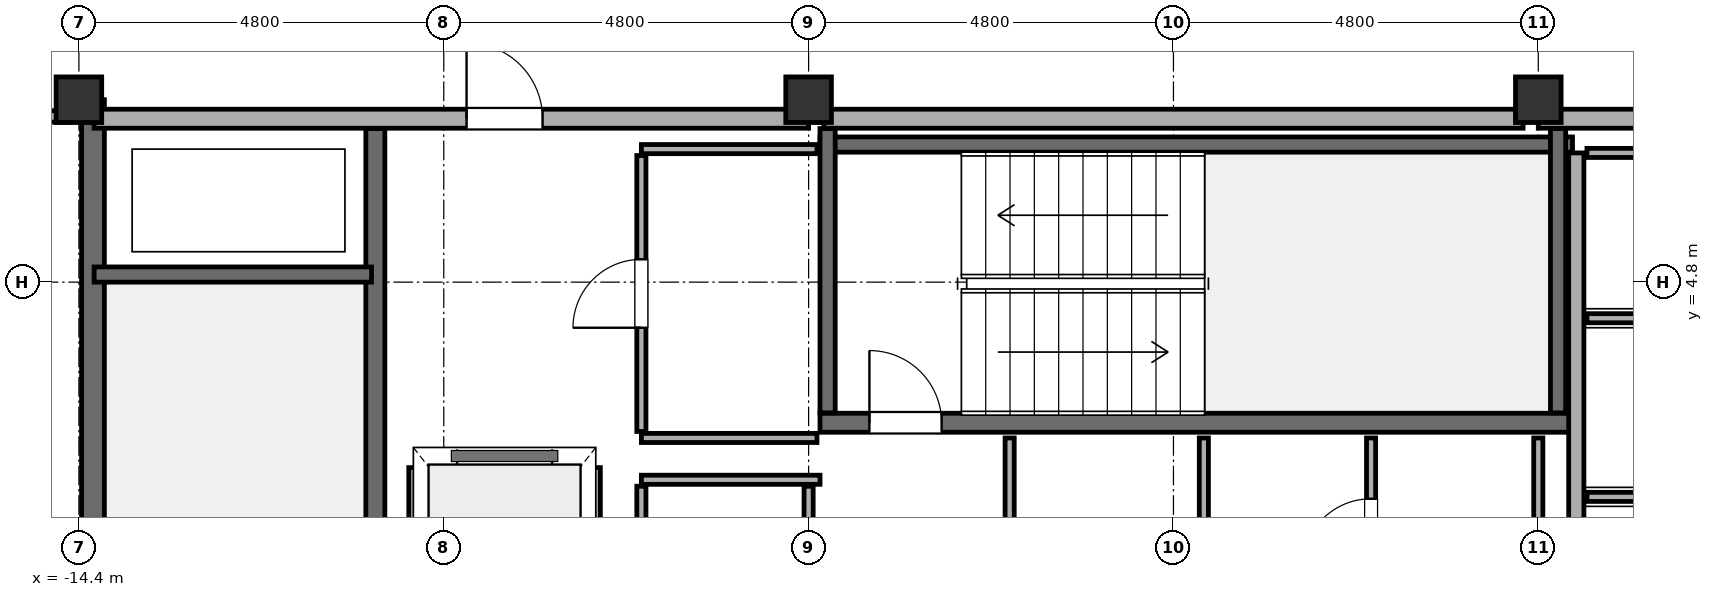
"""IFC4 building model, lengths in metres.
Left out: names, types, materials, properties, quantities, classifications, styles, units other than length and angle.
Written with IfcOpenShell. Run it as: python <this file> out.ifc"""

import sys

from ifc_helpers import new_model, si_unit, direction, frame, frame_2d, origin, origin_2d, place, context, subcontext, project, spatial, rectangle, hollow_rectangle, extrude, element, fill, save


model = new_model("IFC4")
c1 = context("Model", 3, precision=1e-05, world=origin(), true_north=direction((0.0, 1.0)))
c2 = subcontext(c1, "Body", "Model", "MODEL_VIEW")
j1 = project(units=[si_unit("LENGTHUNIT", "METRE"), si_unit("PLANEANGLEUNIT", "RADIAN")], contexts=[c1])
p1 = place(None, origin())
s1 = spatial("IfcSite", under=j1, at=p1, CompositionType="ELEMENT")
p2 = place(p1, origin())
s2 = spatial("IfcBuilding", under=s1, at=p2, CompositionType="ELEMENT")
p3 = place(p2, frame((0.0, 0.0, 249.25)))
s3 = spatial("IfcBuildingStorey", under=s2, at=p3, CompositionType="ELEMENT", Elevation=249.25)
for number, where, z_axis, x_axis in (
    (1, (-14.4, 7.2, 0.0), (0.0, 0.0, 1.0), (1.0, 0.0, 0.0)),
    (2, (-4.8, 7.2, 0.0), (0.0, 0.0, 1.0), (1.0, 0.0, 0.0)),
    (3, (4.8, 7.2, 0.0), (0.0, 0.0, 1.0), (1.0, 0.0, 0.0)),
):
    element("IfcColumn", number, at=place(p3, frame(where, z_axis=z_axis, x_axis=x_axis)), inside=s3, PredefinedType="COLUMN", context=c2, shape_type="SweptSolid", body=[
        extrude(hollow_rectangle(XDim=0.6, YDim=0.6, WallThickness=0.028, at=origin_2d()), origin(), (0.0, 0.0, 1.0), 3.85),
    ])
p4 = place(p3, frame((-14.215, -7.2, -0.18), z_axis=(0.0, 0.0, 1.0), x_axis=(0.0, 1.0, 0.0)))
e4 = element("IfcWall", 4, at=p4, inside=s3, PredefinedType="SHEAR", context=c2, shape_type="SweptSolid", body=[
    extrude(rectangle(XDim=14.4, YDim=0.3, at=frame_2d((7.2, 0.0))), origin(), (0.0, 0.0, 1.0), 3.85),
])
p5 = place(p3, frame((-14.2, 6.95, 0.0), z_axis=(0.0, 0.0, 1.0), x_axis=(1.0, 0.0, 0.0)))
e5 = element("IfcWall", 5, at=p5, inside=s3, PredefinedType="SOLIDWALL", context=c2, shape_type="SweptSolid", body=[
    extrude(rectangle(XDim=9.4, YDim=0.25, at=frame_2d((4.7, 0.0))), origin(), (0.0, 0.0, 1.0), 2.27),
])
p6 = place(p5, frame((4.9, 0.0, 0.0)))
e6 = element("IfcOpeningElement", 6, at=p6, cuts=e5, PredefinedType="OPENING", context=c2, shape_type="SweptSolid", body=[
    extrude(rectangle(XDim=1.0, YDim=2.15, at=frame_2d((0.5, 1.075))), frame((0.0, 0.14, 0.0), z_axis=(0.0, -1.0, 0.0), x_axis=(1.0, 0.0, 0.0)), (0.0, 0.0, 1.0), 0.28),
])
p7 = place(p3, frame((-4.6, 6.95, 0.0), z_axis=(0.0, 0.0, 1.0), x_axis=(1.0, 0.0, 0.0)))
e7 = element("IfcWall", 7, at=p7, inside=s3, PredefinedType="SOLIDWALL", context=c2, shape_type="SweptSolid", body=[
    extrude(rectangle(XDim=9.2, YDim=0.25, at=frame_2d((4.6, 0.0))), origin(), (0.0, 0.0, 1.0), 2.27),
])
p8 = place(p3, frame((4.8, 6.95, 0.0), z_axis=(0.0, 0.0, 1.0), x_axis=(1.0, 0.0, 0.0)))
e8 = element("IfcWall", 8, at=p8, inside=s3, PredefinedType="SOLIDWALL", context=c2, shape_type="SweptSolid", body=[
    extrude(rectangle(XDim=9.4, YDim=0.25, at=frame_2d((4.7, 0.0))), origin(), (0.0, 0.0, 1.0), 2.27),
])
p9 = place(p8, frame((3.5, 0.0, 0.0)))
e9 = element("IfcOpeningElement", 9, at=p9, cuts=e8, PredefinedType="OPENING", context=c2, shape_type="SweptSolid", body=[
    extrude(rectangle(XDim=1.2, YDim=2.2, at=frame_2d((0.6, 1.1))), frame((0.0, 0.14, 0.0), z_axis=(0.0, -1.0, 0.0), x_axis=(1.0, 0.0, 0.0)), (0.0, 0.0, 1.0), 0.28),
])
p10 = place(p3, frame((-10.5, -6.82, -0.18), z_axis=(0.0, 0.0, 1.0), x_axis=(0.0, 1.0, 0.0)))
e10 = element("IfcWall", 10, at=p10, inside=s3, PredefinedType="SOLIDWALL", context=c2, shape_type="SweptSolid", body=[
    extrude(rectangle(XDim=13.64, YDim=0.25, at=frame_2d((6.82, 0.0))), origin(), (0.0, 0.0, 1.0), 3.85),
])
p11 = place(p10, frame((2.32, 0.0, 0.18)))
e11 = element("IfcOpeningElement", 11, at=p11, cuts=e10, PredefinedType="OPENING", context=c2, shape_type="SweptSolid", body=[
    extrude(rectangle(XDim=0.95, YDim=2.15, at=frame_2d((0.475, 1.075))), frame((0.0, 0.14, 0.0), z_axis=(0.0, -1.0, 0.0), x_axis=(1.0, 0.0, 0.0)), (0.0, 0.0, 1.0), 0.28),
])
p12 = place(p3, frame((-14.2, 4.9, -0.18), z_axis=(0.0, 0.0, 1.0), x_axis=(1.0, 0.0, 0.0)))
e12 = element("IfcWall", 12, at=p12, inside=s3, PredefinedType="SOLIDWALL", context=c2, shape_type="SweptSolid", body=[
    extrude(rectangle(XDim=3.65, YDim=0.2, at=frame_2d((1.825, 0.0))), origin(), (0.0, 0.0, 1.0), 3.85),
])
p13 = place(p3, frame((-4.65, 2.95, -0.18), z_axis=(0.0, 0.0, 1.0), x_axis=(1.0, 0.0, 0.0)))
e13 = element("IfcWall", 13, at=p13, inside=s3, PredefinedType="SOLIDWALL", context=c2, shape_type="SweptSolid", body=[
    extrude(rectangle(XDim=9.9, YDim=0.25, at=frame_2d((4.95, 0.0))), origin(), (0.0, 0.0, 1.0), 3.85),
])
p14 = place(p13, frame((0.65, 0.0, 0.18)))
e14 = element("IfcOpeningElement", 14, at=p14, cuts=e13, PredefinedType="OPENING", context=c2, shape_type="SweptSolid", body=[
    extrude(rectangle(XDim=0.95, YDim=2.15, at=frame_2d((0.475, 1.075))), frame((0.0, 0.14, 0.0), z_axis=(0.0, -1.0, 0.0), x_axis=(1.0, 0.0, 0.0)), (0.0, 0.0, 1.0), 0.28),
])
p15 = place(p3, frame((-4.65, 6.61, -0.18), z_axis=(0.0, 0.0, 1.0), x_axis=(1.0, 0.0, 0.0)))
e15 = element("IfcWall", 15, at=p15, inside=s3, PredefinedType="SOLIDWALL", context=c2, shape_type="SweptSolid", body=[
    extrude(rectangle(XDim=9.9, YDim=0.2, at=frame_2d((4.95, 0.0))), origin(), (0.0, 0.0, 1.0), 3.85),
])
for number, where, z_axis, x_axis in (
    (16, (-4.55, 3.08, -0.18), (0.0, 0.0, 1.0), (0.0, 1.0, 0.0)),
    (17, (5.06, 3.08, -0.18), (0.0, 0.0, 1.0), (0.0, 1.0, 0.0)),
):
    element("IfcWall", number, at=place(p3, frame(where, z_axis=z_axis, x_axis=x_axis)), inside=s3, PredefinedType="SOLIDWALL", context=c2, shape_type="SweptSolid", body=[
        extrude(rectangle(XDim=3.74, YDim=0.2, at=frame_2d((1.87, 0.0))), origin(), (0.0, 0.0, 1.0), 3.85),
    ])
p16 = place(p3, frame((5.3, -0.3, 0.0), z_axis=(0.0, 0.0, 1.0), x_axis=(0.0, 1.0, 0.0)))
e18 = element("IfcWall", 18, at=p16, inside=s3, PredefinedType="SOLIDWALL", context=c2, shape_type="SweptSolid", body=[
    extrude(rectangle(XDim=6.8, YDim=0.2, at=frame_2d((3.4, 0.0))), origin(), (0.0, 0.0, 1.0), 3.67),
])
for number, where, z_axis, x_axis in (
    (19, (5.44, 1.975, 0.0), (0.0, 0.0, 1.0), (1.0, 0.0, 0.0)),
    (20, (5.44, 4.325, 0.0), (0.0, 0.0, 1.0), (1.0, 0.0, 0.0)),
    (21, (5.44, 6.5, 0.0), (0.0, 0.0, 1.0), (1.0, 0.0, 0.0)),
):
    element("IfcWall", number, at=place(p3, frame(where, z_axis=z_axis, x_axis=x_axis)), inside=s3, PredefinedType="PARTITIONING", context=c2, shape_type="SweptSolid", body=[
        extrude(rectangle(XDim=2.12, YDim=0.12, at=frame_2d((1.06, 0.0))), origin(), (0.0, 0.0, 1.0), 3.67),
    ])
p17 = place(p3, frame((-9.92, 2.5, 0.0), z_axis=(0.0, 0.0, 1.0), x_axis=(1.0, 0.0, 0.0)))
e22 = element("IfcWall", 22, at=p17, inside=s3, PredefinedType="SOLIDWALL", context=c2, shape_type="SweptSolid", body=[
    extrude(rectangle(XDim=2.24, YDim=0.2, at=frame_2d((1.12, 0.0))), origin(), (0.0, 0.0, 1.0), 3.67),
])
p18 = place(p17, frame((0.495, 0.0, 0.0)))
e23 = element("IfcOpeningElement", 23, at=p18, cuts=e22, PredefinedType="OPENING", context=c2, shape_type="SweptSolid", body=[
    extrude(rectangle(XDim=1.25, YDim=2.25, at=frame_2d((0.625, 1.125))), frame((0.0, 0.115, 0.0), z_axis=(0.0, -1.0, 0.0), x_axis=(1.0, 0.0, 0.0)), (0.0, 0.0, 1.0), 0.23),
])
for number, where, z_axis, x_axis in (
    (24, (-10.0, -0.16, 0.0), (0.0, 0.0, 1.0), (0.0, 1.0, 0.0)),
    (25, (-7.6, -0.16, 0.0), (0.0, 0.0, 1.0), (0.0, 1.0, 0.0)),
):
    element("IfcWall", number, at=place(p3, frame(where, z_axis=z_axis, x_axis=x_axis)), inside=s3, PredefinedType="PARTITIONING", context=c2, shape_type="SweptSolid", body=[
        extrude(rectangle(XDim=2.52, YDim=0.12, at=frame_2d((1.26, 0.0))), origin(), (0.0, 0.0, 1.0), 3.67),
    ])
p19 = place(p3, frame((-7.0, 2.2, 0.0), z_axis=(0.0, 0.0, 1.0), x_axis=(1.0, 0.0, 0.0)))
e26 = element("IfcWall", 26, at=p19, inside=s3, PredefinedType="PARTITIONING", context=c2, shape_type="SweptSolid", body=[
    extrude(rectangle(XDim=2.35, YDim=0.12, at=frame_2d((1.175, 0.0))), origin(), (0.0, 0.0, 1.0), 3.67),
])
for number, where, z_axis, x_axis in (
    (27, (-7.0, 2.75, 0.0), (0.0, 0.0, 1.0), (1.0, 0.0, 0.0)),
    (28, (-7.0, 6.55, 0.0), (0.0, 0.0, 1.0), (1.0, 0.0, 0.0)),
):
    element("IfcWall", number, at=place(p3, frame(where, z_axis=z_axis, x_axis=x_axis)), inside=s3, PredefinedType="PARTITIONING", context=c2, shape_type="SweptSolid", body=[
        extrude(rectangle(XDim=2.31, YDim=0.12, at=frame_2d((1.155, 0.0))), origin(), (0.0, 0.0, 1.0), 3.67),
    ])
p20 = place(p3, frame((-23.92, 6.98, 0.0), z_axis=(0.0, 0.0, 1.0), x_axis=(1.0, 0.0, 0.0)))
e29 = element("IfcWall", 29, at=p20, inside=s3, PredefinedType="PARTITIONING", context=c2, shape_type="SweptSolid", body=[
    extrude(rectangle(XDim=9.4, YDim=0.15, at=frame_2d((4.7, 0.0))), origin(), (0.0, 0.0, 1.0), 2.27),
])
p21 = place(p3, frame((-7.0, -3.11, 0.0), z_axis=(0.0, 0.0, 1.0), x_axis=(0.0, 1.0, 0.0)))
e30 = element("IfcWall", 30, at=p21, inside=s3, PredefinedType="PARTITIONING", context=c2, shape_type="SweptSolid", body=[
    extrude(rectangle(XDim=5.225, YDim=0.12, at=frame_2d((2.613, 0.0))), origin(), (0.0, 0.0, 1.0), 3.67),
])
p22 = place(p3, frame((-7.0, 2.835, 0.0), z_axis=(0.0, 0.0, 1.0), x_axis=(0.0, 1.0, 0.0)))
e31 = element("IfcWall", 31, at=p22, inside=s3, PredefinedType="PARTITIONING", context=c2, shape_type="SweptSolid", body=[
    extrude(rectangle(XDim=3.63, YDim=0.12, at=frame_2d((1.815, 0.0))), origin(), (0.0, 0.0, 1.0), 3.67),
])
p23 = place(p22, frame((1.365, 0.0, 0.0)))
e32 = element("IfcOpeningElement", 32, at=p23, cuts=e31, PredefinedType="OPENING", context=c2, shape_type="SweptSolid", body=[
    extrude(rectangle(XDim=0.9, YDim=2.1, at=frame_2d((0.45, 1.05))), frame((0.0, 0.075, 0.0), z_axis=(0.0, -1.0, 0.0), x_axis=(1.0, 0.0, 0.0)), (0.0, 0.0, 1.0), 0.15),
])
p24 = place(p3, frame((-4.8, -6.415, 0.0), z_axis=(0.0, 0.0, 1.0), x_axis=(0.0, 1.0, 0.0)))
e33 = element("IfcWall", 33, at=p24, inside=s3, PredefinedType="PARTITIONING", context=c2, shape_type="SweptSolid", body=[
    extrude(rectangle(XDim=8.53, YDim=0.12, at=frame_2d((4.265, 0.0))), origin(), (0.0, 0.0, 1.0), 3.67),
])
p25 = place(p24, frame((3.965, 0.0, 0.0)))
e34 = element("IfcOpeningElement", 34, at=p25, cuts=e33, PredefinedType="OPENING", context=c2, shape_type="SweptSolid", body=[
    extrude(rectangle(XDim=0.9, YDim=2.1, at=frame_2d((0.45, 1.05))), frame((0.0, 0.075, 0.0), z_axis=(0.0, -1.0, 0.0), x_axis=(1.0, 0.0, 0.0)), (0.0, 0.0, 1.0), 0.15),
])
p26 = place(p3, frame((-2.155, -6.415, 0.0), z_axis=(0.0, 0.0, 1.0), x_axis=(0.0, 1.0, 0.0)))
e35 = element("IfcWall", 35, at=p26, inside=s3, PredefinedType="PARTITIONING", context=c2, shape_type="SweptSolid", body=[
    extrude(rectangle(XDim=9.165, YDim=0.12, at=frame_2d((4.583, 0.0))), origin(), (0.0, 0.0, 1.0), 3.67),
])
p27 = place(p26, frame((1.765, 0.0, 0.0)))
e36 = element("IfcOpeningElement", 36, at=p27, cuts=e35, PredefinedType="OPENING", context=c2, shape_type="SweptSolid", body=[
    extrude(rectangle(XDim=0.9, YDim=2.1, at=frame_2d((0.45, 1.05))), frame((0.0, 0.075, 0.0), z_axis=(0.0, -1.0, 0.0), x_axis=(1.0, 0.0, 0.0)), (0.0, 0.0, 1.0), 0.15),
])
p28 = place(p26, frame((6.565, 0.0, 0.0)))
e37 = element("IfcOpeningElement", 37, at=p28, cuts=e35, PredefinedType="OPENING", context=c2, shape_type="SweptSolid", body=[
    extrude(rectangle(XDim=0.9, YDim=2.1, at=frame_2d((0.45, 1.05))), frame((0.0, 0.075, 0.0), z_axis=(0.0, -1.0, 0.0), x_axis=(1.0, 0.0, 0.0)), (0.0, 0.0, 1.0), 0.15),
])
p29 = place(p3, frame((0.4, -6.415, 0.0), z_axis=(0.0, 0.0, 1.0), x_axis=(0.0, 1.0, 0.0)))
e38 = element("IfcWall", 38, at=p29, inside=s3, PredefinedType="PARTITIONING", context=c2, shape_type="SweptSolid", body=[
    extrude(rectangle(XDim=9.165, YDim=0.12, at=frame_2d((4.583, 0.0))), origin(), (0.0, 0.0, 1.0), 3.67),
])
p30 = place(p3, frame((2.6, 0.3, 0.0), z_axis=(0.0, 0.0, 1.0), x_axis=(0.0, 1.0, 0.0)))
e39 = element("IfcWall", 39, at=p30, inside=s3, PredefinedType="PARTITIONING", context=c2, shape_type="SweptSolid", body=[
    extrude(rectangle(XDim=2.45, YDim=0.12, at=frame_2d((1.225, 0.0))), origin(), (0.0, 0.0, 1.0), 3.67),
])
p31 = place(p30, frame((0.75, 0.0, 0.0)))
e40 = element("IfcOpeningElement", 40, at=p31, cuts=e39, PredefinedType="OPENING", context=c2, shape_type="SweptSolid", body=[
    extrude(rectangle(XDim=0.9, YDim=2.1, at=frame_2d((0.45, 1.05))), frame((0.0, 0.075, 0.0), z_axis=(0.0, -1.0, 0.0), x_axis=(1.0, 0.0, 0.0)), (0.0, 0.0, 1.0), 0.15),
])
p32 = place(p3, frame((4.8, 0.3, 0.0), z_axis=(0.0, 0.0, 1.0), x_axis=(0.0, 1.0, 0.0)))
e41 = element("IfcWall", 41, at=p32, inside=s3, PredefinedType="PARTITIONING", context=c2, shape_type="SweptSolid", body=[
    extrude(rectangle(XDim=2.45, YDim=0.12, at=frame_2d((1.225, 0.0))), origin(), (0.0, 0.0, 1.0), 3.67),
])
p33 = place(p6, origin())
e42 = element("IfcDoor", 42, at=p33, inside=s3, OperationType="SINGLE_SWING_RIGHT", PredefinedType="DOOR", context=c2, shape_type="SweptSolid", body=[
    extrude(rectangle(XDim=1.0, YDim=2.15, at=frame_2d((0.5, 1.075))), frame((0.0, 0.025, 0.0), z_axis=(0.0, -1.0, 0.0), x_axis=(1.0, 0.0, 0.0)), (0.0, 0.0, 1.0), 0.05),
])
fill(e6, e42)
p34 = place(p14, origin())
e43 = element("IfcDoor", 43, at=p34, inside=s3, OperationType="SINGLE_SWING_LEFT", PredefinedType="DOOR", context=c2, shape_type="SweptSolid", body=[
    extrude(rectangle(XDim=0.95, YDim=2.15, at=frame_2d((0.475, 1.075))), frame((0.0, 0.025, 0.0), z_axis=(0.0, -1.0, 0.0), x_axis=(1.0, 0.0, 0.0)), (0.0, 0.0, 1.0), 0.05),
])
fill(e14, e43)
p35 = place(p18, origin())
e44 = element("IfcDoor", 44, at=p35, inside=s3, OperationType="SLIDING_TO_LEFT", PredefinedType="DOOR", context=c2, shape_type="SweptSolid", body=[
    extrude(rectangle(XDim=1.25, YDim=2.25, at=frame_2d((0.625, 1.125))), frame((0.0, 0.025, 0.0), z_axis=(0.0, -1.0, 0.0), x_axis=(1.0, 0.0, 0.0)), (0.0, 0.0, 1.0), 0.05),
])
fill(e23, e44)
p36 = place(p23, origin())
e45 = element("IfcDoor", 45, at=p36, inside=s3, OperationType="SINGLE_SWING_RIGHT", PredefinedType="DOOR", context=c2, shape_type="SweptSolid", body=[
    extrude(rectangle(XDim=0.9, YDim=2.1, at=frame_2d((0.45, 1.05))), frame((0.0, 0.025, 0.0), z_axis=(0.0, -1.0, 0.0), x_axis=(1.0, 0.0, 0.0)), (0.0, 0.0, 1.0), 0.05),
])
fill(e32, e45)
p37 = place(p31, origin())
e46 = element("IfcDoor", 46, at=p37, inside=s3, OperationType="SINGLE_SWING_LEFT", PredefinedType="DOOR", context=c2, shape_type="SweptSolid", body=[
    extrude(rectangle(XDim=0.9, YDim=2.1, at=frame_2d((0.45, 1.05))), frame((0.0, 0.025, 0.0), z_axis=(0.0, -1.0, 0.0), x_axis=(1.0, 0.0, 0.0)), (0.0, 0.0, 1.0), 0.05),
])
fill(e40, e46)
save(model, sys.argv[1])
